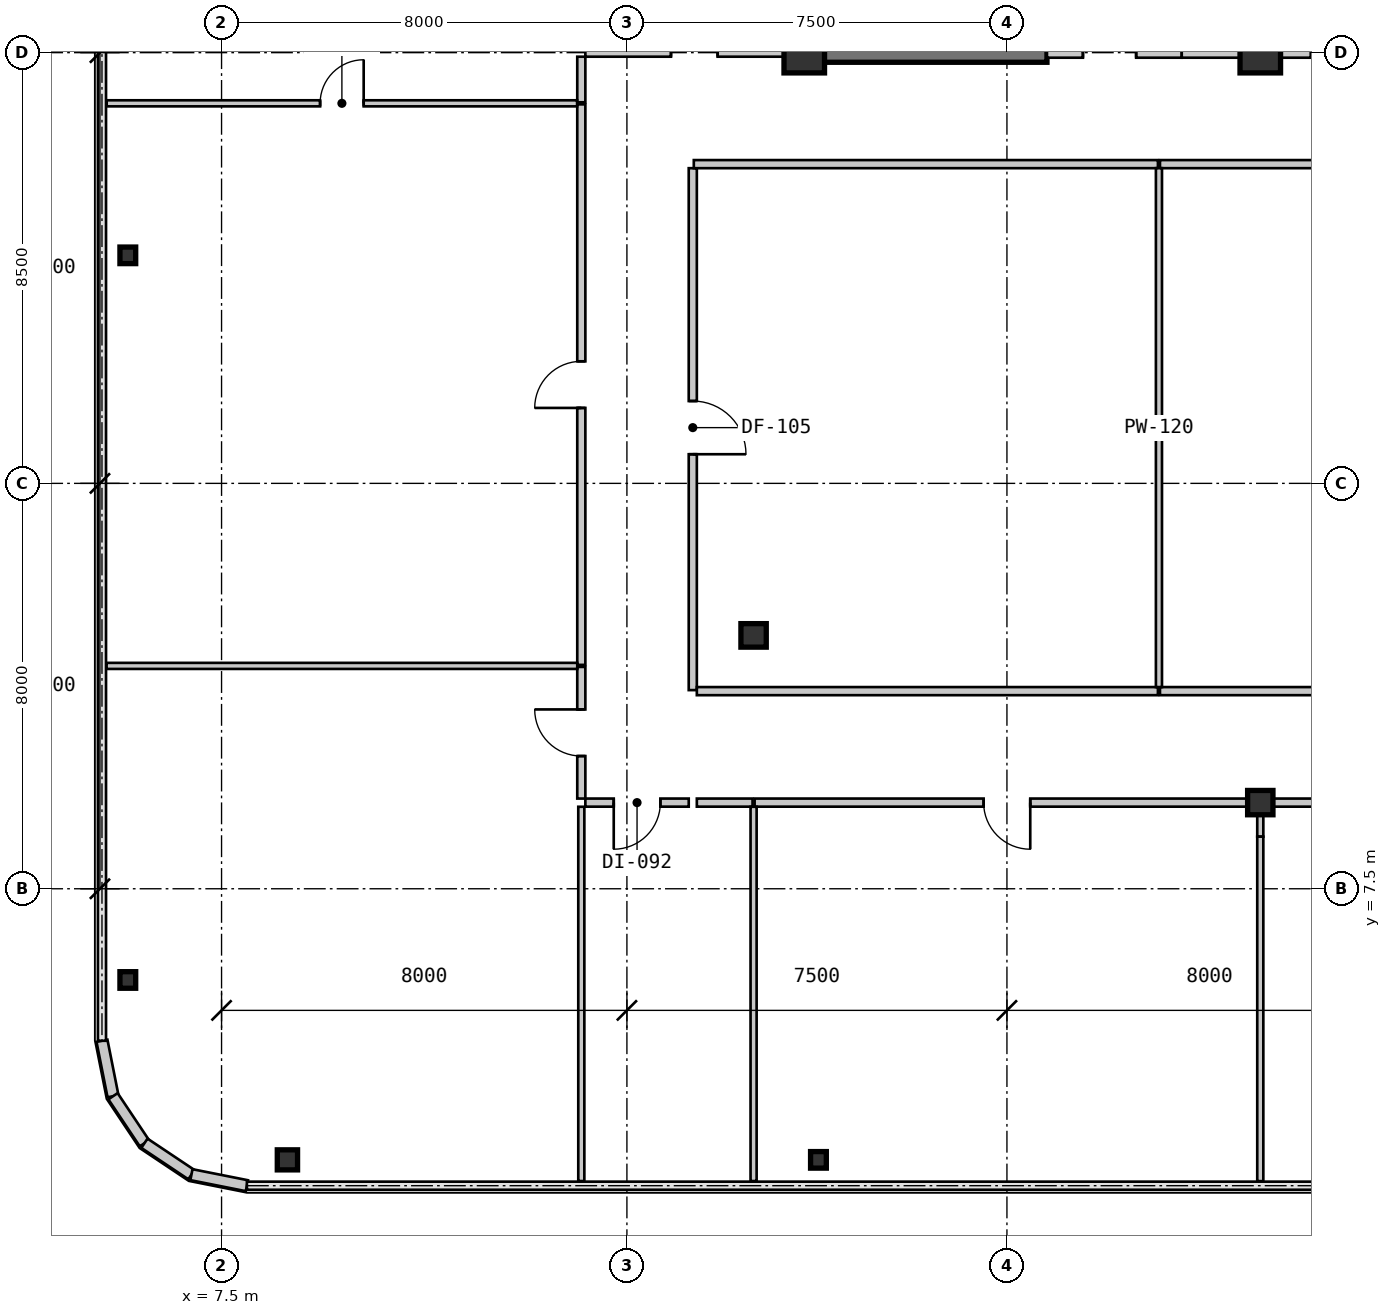
"""IFC4 building model, lengths in metres.
Left out: names, types, materials, properties, quantities, classifications, styles, units other than length and angle.
Written with IfcOpenShell. Run it as: python <this file> out.ifc"""

import sys

from ifc_helpers import new_model, si_unit, direction, frame, frame_2d, origin, origin_2d, place, context, subcontext, project, spatial, rectangle, i_section, extrude, source, transform, mapped, element, fill, save


model = new_model("IFC4")
c1 = context("Model", 3, precision=1e-05, world=origin(), true_north=direction((0.0, 1.0)))
c2 = subcontext(c1, "Body", "Model", "MODEL_VIEW")
j1 = project(units=[si_unit("LENGTHUNIT", "METRE"), si_unit("PLANEANGLEUNIT", "RADIAN")], contexts=[c1])
p1 = place(None, origin())
s1 = spatial("IfcSite", under=j1, at=p1, CompositionType="ELEMENT")
p2 = place(p1, origin())
s2 = spatial("IfcBuilding", under=s1, at=p2, CompositionType="ELEMENT")
p3 = place(p2, frame((0.0, 0.0, 57.75)))
s3 = spatial("IfcBuildingStorey", under=s2, at=p3, CompositionType="ELEMENT", Elevation=57.75)
m1 = source(origin(), c2, "Body", "SweptSolid", [
    extrude(rectangle(XDim=0.8, YDim=0.8, at=origin_2d()), origin(), (0.0, 0.0, 1.0), 3.15),
])
for number, where, z_axis, x_axis in (
    (1, (19.0, 24.0, 0.0), (0.0, 0.0, 1.0), (1.0, 0.0, 0.0)),
    (2, (28.0, 24.0, 0.0), (0.0, 0.0, 1.0), (1.0, 0.0, 0.0)),
):
    element("IfcColumn", number, at=place(p3, frame(where, z_axis=z_axis, x_axis=x_axis)), inside=s3, PredefinedType="COLUMN", context=c2, shape_type="MappedRepresentation", body=[
        mapped(m1, transform((0.0, 0.0, 0.0), scale=1.0)),
    ])
m2 = source(origin(), c2, "Body", "SweptSolid", [
    extrude(i_section(OverallWidth=0.5, OverallDepth=0.48, WebThickness=0.028, FlangeThickness=0.044, at=origin_2d()), origin(), (0.0, 0.0, 1.0), 3.15),
])
p4 = place(p3, frame((28.0, 9.2, 0.0), z_axis=(0.0, 0.0, 1.0), x_axis=(1.0, 0.0, 0.0)))
e3 = element("IfcColumn", 3, at=p4, inside=s3, PredefinedType="COLUMN", context=c2, shape_type="MappedRepresentation", body=[
    mapped(m2, transform((0.0, 0.0, 0.0), scale=1.0)),
])
m3 = source(origin(), c2, "Body", "SweptSolid", [
    extrude(i_section(OverallWidth=0.5, OverallDepth=0.464, WebThickness=0.022, FlangeThickness=0.034, at=origin_2d()), origin(), (0.0, 0.0, 1.0), 3.15),
])
p5 = place(p3, frame((18.0, 12.5, 0.0), z_axis=(0.0, 0.0, 1.0), x_axis=(1.0, 0.0, 0.0)))
e4 = element("IfcColumn", 4, at=p5, inside=s3, PredefinedType="COLUMN", context=c2, shape_type="MappedRepresentation", body=[
    mapped(m3, transform((0.0, 0.0, 0.0), scale=1.0)),
])
m4 = source(origin(), c2, "Body", "SweptSolid", [
    extrude(i_section(OverallWidth=0.4, OverallDepth=0.396, WebThickness=0.022, FlangeThickness=0.034, at=origin_2d()), origin(), (0.0, 0.0, 1.0), 3.15),
])
p6 = place(p3, frame((8.8, 2.15, 0.0), z_axis=(0.0, 0.0, 1.0), x_axis=(1.0, 0.0, 0.0)))
e5 = element("IfcColumn", 5, at=p6, inside=s3, PredefinedType="COLUMN", context=c2, shape_type="MappedRepresentation", body=[
    mapped(m4, transform((0.0, 0.0, 0.0), scale=1.0)),
])
m5 = source(origin(), c2, "Body", "SweptSolid", [
    extrude(i_section(OverallWidth=0.311, OverallDepth=0.327, WebThickness=0.016, FlangeThickness=0.025, at=origin_2d()), origin(), (0.0, 0.0, 1.0), 3.15),
])
for number, where, z_axis, x_axis in (
    (6, (19.28, 2.15, 0.0), (0.0, 0.0, 1.0), (1.0, 0.0, 0.0)),
    (7, (5.65, 5.7, 0.0), (0.0, 0.0, 1.0), (1.0, 0.0, 0.0)),
    (8, (5.65, 20.0, 0.0), (0.0, 0.0, 1.0), (1.0, 0.0, 0.0)),
):
    element("IfcColumn", number, at=place(p3, frame(where, z_axis=z_axis, x_axis=x_axis)), inside=s3, PredefinedType="COLUMN", context=c2, shape_type="MappedRepresentation", body=[
        mapped(m5, transform((0.0, 0.0, 0.0), scale=1.0)),
    ])
m6 = source(origin(), c2, "Body", "SweptSolid", [
    extrude(rectangle(XDim=1.116, YDim=0.22, at=frame_2d((0.558, 0.0))), origin(), (0.0, 0.0, 1.0), 2.87),
])
for number, where, z_axis, x_axis in (
    (9, (5.14, 4.5, 0.0), (0.0, 0.0, 1.0), (0.195, -0.981, 0.0)),
    (10, (5.358, 3.406, 0.0), (0.0, 0.0, 1.0), (0.556, -0.831, 0.0)),
    (11, (5.978, 2.478, 0.0), (0.0, 0.0, 1.0), (0.831, -0.556, 0.0)),
    (12, (6.906, 1.858, 0.0), (0.0, 0.0, 1.0), (0.981, -0.195, 0.0)),
):
    element("IfcWall", number, at=place(p3, frame(where, z_axis=z_axis, x_axis=x_axis)), inside=s3, PredefinedType="SOLIDWALL", context=c2, shape_type="MappedRepresentation", body=[
        mapped(m6, transform((0.0, 0.0, 0.0), scale=1.0)),
    ])
m7 = source(origin(), c2, "Body", "SweptSolid", [
    extrude(rectangle(XDim=4.98, YDim=0.38, at=frame_2d((2.49, 0.0))), origin(), (0.0, 0.0, 1.0), 2.87),
])
p7 = place(p3, frame((18.81, 24.0, 0.0), z_axis=(0.0, 0.0, 1.0), x_axis=(1.0, 0.0, 0.0)))
e13 = element("IfcWall", 13, at=p7, inside=s3, PredefinedType="SHEAR", context=c2, shape_type="MappedRepresentation", body=[
    mapped(m7, transform((0.0, 0.0, 0.0), scale=1.0)),
])
m8 = source(origin(), c2, "Body", "SweptSolid", [
    extrude(rectangle(XDim=2.66, YDim=0.2, at=frame_2d((1.33, 0.0))), origin(), (0.0, 0.0, 1.0), 2.41),
])
p8 = place(p3, frame((23.79, 24.0, 0.0), z_axis=(0.0, 0.0, 1.0), x_axis=(1.0, 0.0, 0.0)))
e14 = element("IfcWall", 14, at=p8, inside=s3, PredefinedType="SOLIDWALL", context=c2, shape_type="MappedRepresentation", body=[
    mapped(m8, transform((0.0, 0.0, 0.0), scale=1.0)),
])
m9 = source(origin(), c2, "Body", "SweptSolid", [
    extrude(rectangle(XDim=1.05, YDim=2.1, at=frame_2d((0.525, 1.05))), frame((0.0, 0.11, 0.0), z_axis=(0.0, -1.0, 0.0), x_axis=(1.0, 0.0, 0.0)), (0.0, 0.0, 1.0), 0.22),
])
p9 = place(p8, frame((0.71, 0.0, 0.0)))
e15 = element("IfcOpeningElement", 15, at=p9, cuts=e14, PredefinedType="OPENING", context=c2, shape_type="MappedRepresentation", body=[
    mapped(m9, transform((0.0, 0.0, 0.0), scale=1.0)),
])
m10 = source(origin(), c2, "Body", "SweptSolid", [
    extrude(rectangle(XDim=4.35, YDim=0.2, at=frame_2d((2.175, 0.0))), origin(), (0.0, 0.0, 1.0), 2.41),
])
p10 = place(p3, frame((30.8, 24.0, 0.0), z_axis=(0.0, 0.0, 1.0), x_axis=(-1.0, 0.0, 0.0)))
e16 = element("IfcWall", 16, at=p10, inside=s3, PredefinedType="SOLIDWALL", context=c2, shape_type="MappedRepresentation", body=[
    mapped(m10, transform((0.0, 0.0, 0.0), scale=1.0)),
])
p11 = place(p10, frame((0.75, 0.0, 0.0)))
e17 = element("IfcOpeningElement", 17, at=p11, cuts=e16, PredefinedType="OPENING", context=c2, shape_type="MappedRepresentation", body=[
    mapped(m9, transform((0.0, 0.0, 0.0), scale=1.0)),
])
m11 = source(origin(), c2, "Body", "SweptSolid", [
    extrude(rectangle(XDim=10.3, YDim=0.16, at=frame_2d((5.15, 0.0))), origin(), (0.0, 0.0, 1.0), 2.87),
])
p12 = place(p3, frame((16.8, 21.72, 0.0), z_axis=(0.0, 0.0, 1.0), x_axis=(0.0, -1.0, 0.0)))
e18 = element("IfcWall", 18, at=p12, inside=s3, PredefinedType="PARTITIONING", context=c2, shape_type="MappedRepresentation", body=[
    mapped(m11, transform((0.0, 0.0, 0.0), scale=1.0)),
])
m12 = source(origin(), c2, "Body", "SweptSolid", [
    extrude(rectangle(XDim=1.05, YDim=2.1, at=frame_2d((0.525, 1.05))), frame((0.0, 0.09, 0.0), z_axis=(0.0, -1.0, 0.0), x_axis=(1.0, 0.0, 0.0)), (0.0, 0.0, 1.0), 0.18),
])
p13 = place(p12, frame((4.595, 0.0, 0.0)))
e19 = element("IfcOpeningElement", 19, at=p13, cuts=e18, PredefinedType="OPENING", context=c2, shape_type="MappedRepresentation", body=[
    mapped(m12, transform((0.0, 0.0, 0.0), scale=1.0)),
])
m13 = source(origin(), c2, "Body", "SweptSolid", [
    extrude(rectangle(XDim=9.159, YDim=0.16, at=frame_2d((4.58, 0.0))), origin(), (0.0, 0.0, 1.0), 2.87),
])
p14 = place(p3, frame((25.98, 21.8, 0.0), z_axis=(0.0, 0.0, 1.0), x_axis=(-1.0, 0.0, 0.0)))
e20 = element("IfcWall", 20, at=p14, inside=s3, PredefinedType="PARTITIONING", context=c2, shape_type="MappedRepresentation", body=[
    mapped(m13, transform((0.0, 0.0, 0.0), scale=1.0)),
])
m14 = source(origin(), c2, "Body", "SweptSolid", [
    extrude(rectangle(XDim=9.959, YDim=0.16, at=frame_2d((4.98, 0.0))), origin(), (0.0, 0.0, 1.0), 2.87),
])
p15 = place(p3, frame((35.98, 21.8, 0.0), z_axis=(0.0, 0.0, 1.0), x_axis=(-1.0, 0.0, 0.0)))
e21 = element("IfcWall", 21, at=p15, inside=s3, PredefinedType="PARTITIONING", context=c2, shape_type="MappedRepresentation", body=[
    mapped(m14, transform((0.0, 0.0, 0.0), scale=1.0)),
])
p16 = place(p15, frame((4.455, 0.0, 0.0)))
e22 = element("IfcOpeningElement", 22, at=p16, cuts=e21, PredefinedType="OPENING", context=c2, shape_type="MappedRepresentation", body=[
    mapped(m12, transform((0.0, 0.0, 0.0), scale=1.0)),
])
m15 = source(origin(), c2, "Body", "SweptSolid", [
    extrude(rectangle(XDim=2.04, YDim=0.16, at=frame_2d((1.02, 0.0))), origin(), (0.0, 0.0, 1.0), 2.87),
])
p17 = place(p3, frame((16.72, 9.2, 0.0), z_axis=(0.0, 0.0, 1.0), x_axis=(-1.0, 0.0, 0.0)))
e23 = element("IfcWall", 23, at=p17, inside=s3, PredefinedType="PARTITIONING", context=c2, shape_type="MappedRepresentation", body=[
    mapped(m15, transform((0.0, 0.0, 0.0), scale=1.0)),
])
m16 = source(origin(), c2, "Body", "SweptSolid", [
    extrude(rectangle(XDim=0.92, YDim=2.1, at=frame_2d((0.46, 1.05))), frame((0.0, 0.09, 0.0), z_axis=(0.0, -1.0, 0.0), x_axis=(1.0, 0.0, 0.0)), (0.0, 0.0, 1.0), 0.18),
])
p18 = place(p17, frame((0.56, 0.0, 0.0)))
e24 = element("IfcOpeningElement", 24, at=p18, cuts=e23, PredefinedType="OPENING", context=c2, shape_type="MappedRepresentation", body=[
    mapped(m16, transform((0.0, 0.0, 0.0), scale=1.0)),
])
m17 = source(origin(), c2, "Body", "SweptSolid", [
    extrude(rectangle(XDim=2.598, YDim=0.16, at=frame_2d((1.299, 0.0))), origin(), (0.0, 0.0, 1.0), 2.87),
])
p19 = place(p3, frame((14.6, 9.28, 0.0), z_axis=(0.0, 0.0, 1.0), x_axis=(0.0, 1.0, 0.0)))
e25 = element("IfcWall", 25, at=p19, inside=s3, PredefinedType="PARTITIONING", context=c2, shape_type="MappedRepresentation", body=[
    mapped(m17, transform((0.0, 0.0, 0.0), scale=1.0)),
])
p20 = place(p19, frame((0.839, 0.0, 0.0)))
e26 = element("IfcOpeningElement", 26, at=p20, cuts=e25, PredefinedType="OPENING", context=c2, shape_type="MappedRepresentation", body=[
    mapped(m16, transform((0.0, 0.0, 0.0), scale=1.0)),
])
m18 = source(origin(), c2, "Body", "SweptSolid", [
    extrude(rectangle(XDim=11.061, YDim=0.16, at=frame_2d((5.531, 0.0))), origin(), (0.0, 0.0, 1.0), 2.87),
])
p21 = place(p3, frame((14.6, 11.918, 0.0), z_axis=(0.0, 0.0, 1.0), x_axis=(0.0, 1.0, 0.0)))
e27 = element("IfcWall", 27, at=p21, inside=s3, PredefinedType="PARTITIONING", context=c2, shape_type="MappedRepresentation", body=[
    mapped(m18, transform((0.0, 0.0, 0.0), scale=1.0)),
])
p22 = place(p21, frame((5.071, 0.0, 0.0)))
e28 = element("IfcOpeningElement", 28, at=p22, cuts=e27, PredefinedType="OPENING", context=c2, shape_type="MappedRepresentation", body=[
    mapped(m16, transform((0.0, 0.0, 0.0), scale=1.0)),
])
m19 = source(origin(), c2, "Body", "SweptSolid", [
    extrude(rectangle(XDim=0.9, YDim=0.16, at=frame_2d((0.45, 0.0))), origin(), (0.0, 0.0, 1.0), 2.87),
])
p23 = place(p3, frame((14.6, 23.02, 0.0), z_axis=(0.0, 0.0, 1.0), x_axis=(0.0, 1.0, 0.0)))
e29 = element("IfcWall", 29, at=p23, inside=s3, PredefinedType="PARTITIONING", context=c2, shape_type="MappedRepresentation", body=[
    mapped(m19, transform((0.0, 0.0, 0.0), scale=1.0)),
])
m20 = source(origin(), c2, "Body", "SweptSolid", [
    extrude(rectangle(XDim=4.13, YDim=0.16, at=frame_2d((2.065, 0.0))), origin(), (0.0, 0.0, 1.0), 2.87),
])
p24 = place(p3, frame((14.68, 24.0, 0.0), z_axis=(0.0, 0.0, 1.0), x_axis=(1.0, 0.0, 0.0)))
e30 = element("IfcWall", 30, at=p24, inside=s3, PredefinedType="PARTITIONING", context=c2, shape_type="MappedRepresentation", body=[
    mapped(m20, transform((0.0, 0.0, 0.0), scale=1.0)),
])
p25 = place(p24, frame((1.69, 0.0, 0.0)))
e31 = element("IfcOpeningElement", 31, at=p25, cuts=e30, PredefinedType="OPENING", context=c2, shape_type="MappedRepresentation", body=[
    mapped(m16, transform((0.0, 0.0, 0.0), scale=1.0)),
])
m21 = source(origin(), c2, "Body", "SweptSolid", [
    extrude(rectangle(XDim=9.1, YDim=0.16, at=frame_2d((4.55, 0.0))), origin(), (0.0, 0.0, 1.0), 2.87),
])
p26 = place(p3, frame((16.88, 11.4, 0.0), z_axis=(0.0, 0.0, 1.0), x_axis=(1.0, 0.0, 0.0)))
e32 = element("IfcWall", 32, at=p26, inside=s3, PredefinedType="PARTITIONING", context=c2, shape_type="MappedRepresentation", body=[
    mapped(m21, transform((0.0, 0.0, 0.0), scale=1.0)),
])
p27 = place(p3, frame((26.02, 11.4, 0.0), z_axis=(0.0, 0.0, 1.0), x_axis=(1.0, 0.0, 0.0)))
e33 = element("IfcWall", 33, at=p27, inside=s3, PredefinedType="PARTITIONING", context=c2, shape_type="MappedRepresentation", body=[
    mapped(m14, transform((0.0, 0.0, 0.0), scale=1.0)),
])
m22 = source(origin(), c2, "Body", "SweptSolid", [
    extrude(rectangle(XDim=1.1, YDim=0.16, at=frame_2d((0.55, 0.0))), origin(), (0.0, 0.0, 1.0), 2.87),
])
p28 = place(p3, frame((17.98, 9.2, 0.0), z_axis=(0.0, 0.0, 1.0), x_axis=(-1.0, 0.0, 0.0)))
e34 = element("IfcWall", 34, at=p28, inside=s3, PredefinedType="PARTITIONING", context=c2, shape_type="MappedRepresentation", body=[
    mapped(m22, transform((0.0, 0.0, 0.0), scale=1.0)),
])
p29 = place(p3, frame((27.98, 9.2, 0.0), z_axis=(0.0, 0.0, 1.0), x_axis=(-1.0, 0.0, 0.0)))
e35 = element("IfcWall", 35, at=p29, inside=s3, PredefinedType="PARTITIONING", context=c2, shape_type="MappedRepresentation", body=[
    mapped(m14, transform((0.0, 0.0, 0.0), scale=1.0)),
])
p30 = place(p29, frame((4.52, 0.0, 0.0)))
e36 = element("IfcOpeningElement", 36, at=p30, cuts=e35, PredefinedType="OPENING", context=c2, shape_type="MappedRepresentation", body=[
    mapped(m16, transform((0.0, 0.0, 0.0), scale=1.0)),
])
m23 = source(origin(), c2, "Body", "SweptSolid", [
    extrude(rectangle(XDim=13.959, YDim=0.16, at=frame_2d((6.98, 0.0))), origin(), (0.0, 0.0, 1.0), 2.268),
])
p31 = place(p3, frame((41.98, 9.2, 0.0), z_axis=(0.0, 0.0, 1.0), x_axis=(-1.0, 0.0, 0.0)))
e37 = element("IfcWall", 37, at=p31, inside=s3, PredefinedType="PARTITIONING", context=c2, shape_type="MappedRepresentation", body=[
    mapped(m23, transform((0.0, 0.0, 0.0), scale=1.0)),
])
p32 = place(p31, frame((6.52, 0.0, 0.0)))
e38 = element("IfcOpeningElement", 38, at=p32, cuts=e37, PredefinedType="OPENING", context=c2, shape_type="MappedRepresentation", body=[
    mapped(m16, transform((0.0, 0.0, 0.0), scale=1.0)),
])
m24 = source(origin(), c2, "Body", "SweptSolid", [
    extrude(rectangle(XDim=10.24, YDim=0.12, at=frame_2d((5.12, 0.0))), origin(), (0.0, 0.0, 1.0), 2.87),
])
p33 = place(p3, frame((26.0, 21.72, 0.0), z_axis=(0.0, 0.0, 1.0), x_axis=(0.0, -1.0, 0.0)))
e39 = element("IfcWall", 39, at=p33, inside=s3, PredefinedType="PARTITIONING", context=c2, shape_type="MappedRepresentation", body=[
    mapped(m24, transform((0.0, 0.0, 0.0), scale=1.0)),
])
m25 = source(origin(), c2, "Body", "SweptSolid", [
    extrude(rectangle(XDim=7.386, YDim=0.12, at=frame_2d((3.693, 0.0))), origin(), (0.0, 0.0, 1.0), 2.87),
])
for number, where, z_axis, x_axis in (
    (40, (18.0, 9.118, 0.0), (0.0, 0.0, 1.0), (0.0, -1.0, 0.0)),
    (41, (14.6, 1.732, 0.0), (0.0, 0.0, 1.0), (0.0, 1.0, 0.0)),
):
    element("IfcWall", number, at=place(p3, frame(where, z_axis=z_axis, x_axis=x_axis)), inside=s3, PredefinedType="PARTITIONING", context=c2, shape_type="MappedRepresentation", body=[
        mapped(m25, transform((0.0, 0.0, 0.0), scale=1.0)),
    ])
m26 = source(origin(), c2, "Body", "SweptSolid", [
    extrude(rectangle(XDim=0.592, YDim=0.12, at=frame_2d((0.296, 0.0))), origin(), (0.0, 0.0, 1.0), 2.337),
])
p34 = place(p3, frame((28.0, 9.12, 0.0), z_axis=(0.0, 0.0, 1.0), x_axis=(0.0, -1.0, 0.0)))
e42 = element("IfcWall", 42, at=p34, inside=s3, PredefinedType="PARTITIONING", context=c2, shape_type="MappedRepresentation", body=[
    mapped(m26, transform((0.0, 0.0, 0.0), scale=1.0)),
])
m27 = source(origin(), c2, "Body", "SweptSolid", [
    extrude(rectangle(XDim=6.798, YDim=0.12, at=frame_2d((3.399, 0.0))), origin(), (0.0, 0.0, 1.0), 2.87),
])
p35 = place(p3, frame((28.0, 8.528, 0.0), z_axis=(0.0, 0.0, 1.0), x_axis=(0.0, -1.0, 0.0)))
e43 = element("IfcWall", 43, at=p35, inside=s3, PredefinedType="PARTITIONING", context=c2, shape_type="MappedRepresentation", body=[
    mapped(m27, transform((0.0, 0.0, 0.0), scale=1.0)),
])
m28 = source(origin(), c2, "Body", "SweptSolid", [
    extrude(rectangle(XDim=9.29, YDim=0.12, at=frame_2d((4.645, 0.0))), origin(), (0.0, 0.0, 1.0), 2.87),
])
p36 = place(p3, frame((5.23, 11.898, 0.0), z_axis=(0.0, 0.0, 1.0), x_axis=(1.0, 0.0, 0.0)))
e44 = element("IfcWall", 44, at=p36, inside=s3, PredefinedType="PARTITIONING", context=c2, shape_type="MappedRepresentation", body=[
    mapped(m28, transform((0.0, 0.0, 0.0), scale=1.0)),
])
m29 = source(origin(), c2, "Body", "SweptSolid", [
    extrude(rectangle(XDim=9.284, YDim=0.12, at=frame_2d((4.642, 0.0))), origin(), (0.0, 0.0, 1.0), 2.87),
])
p37 = place(p3, frame((5.233, 23.0, 0.0), z_axis=(0.0, 0.0, 1.0), x_axis=(1.0, 0.0, 0.0)))
e45 = element("IfcWall", 45, at=p37, inside=s3, PredefinedType="PARTITIONING", context=c2, shape_type="MappedRepresentation", body=[
    mapped(m29, transform((0.0, 0.0, 0.0), scale=1.0)),
])
m30 = source(origin(), c2, "Body", "SweptSolid", [
    extrude(rectangle(XDim=0.86, YDim=2.1, at=frame_2d((0.43, 1.05))), frame((0.0, 0.07, 0.0), z_axis=(0.0, -1.0, 0.0), x_axis=(1.0, 0.0, 0.0)), (0.0, 0.0, 1.0), 0.14),
])
p38 = place(p37, frame((4.212, 0.0, 0.0)))
e46 = element("IfcOpeningElement", 46, at=p38, cuts=e45, PredefinedType="OPENING", context=c2, shape_type="MappedRepresentation", body=[
    mapped(m30, transform((0.0, 0.0, 0.0), scale=1.0)),
])
m31 = source(origin(), c2, "Body", "SweptSolid", [
    extrude(rectangle(XDim=1.05, YDim=2.1, at=frame_2d((0.525, 1.05))), frame((0.0, 0.025, 0.0), z_axis=(0.0, -1.0, 0.0), x_axis=(1.0, 0.0, 0.0)), (0.0, 0.0, 1.0), 0.05),
])
p39 = place(p9, origin())
e47 = element("IfcDoor", 47, at=p39, inside=s3, OperationType="SINGLE_SWING_LEFT", PredefinedType="DOOR", context=c2, shape_type="MappedRepresentation", body=[
    mapped(m31, transform((0.0, 0.0, 0.0), scale=1.0)),
])
fill(e15, e47)
p40 = place(p11, frame((1.05, 0.0, 0.0), z_axis=(0.0, 0.0, 1.0), x_axis=(-1.0, 0.0, 0.0)))
e48 = element("IfcDoor", 48, at=p40, inside=s3, OperationType="SINGLE_SWING_RIGHT", PredefinedType="DOOR", context=c2, shape_type="MappedRepresentation", body=[
    mapped(m31, transform((0.0, 0.0, 0.0), scale=1.0)),
])
fill(e17, e48)
p41 = place(p13, origin())
e49 = element("IfcDoor", 49, at=p41, inside=s3, OperationType="SINGLE_SWING_RIGHT", PredefinedType="DOOR", context=c2, shape_type="MappedRepresentation", body=[
    mapped(m31, transform((0.0, 0.0, 0.0), scale=1.0)),
])
fill(e19, e49)
m32 = source(origin(), c2, "Body", "SweptSolid", [
    extrude(rectangle(XDim=0.92, YDim=2.1, at=frame_2d((0.46, 1.05))), frame((0.0, 0.025, 0.0), z_axis=(0.0, -1.0, 0.0), x_axis=(1.0, 0.0, 0.0)), (0.0, 0.0, 1.0), 0.05),
])
p42 = place(p18, origin())
e50 = element("IfcDoor", 50, at=p42, inside=s3, OperationType="SINGLE_SWING_RIGHT", PredefinedType="DOOR", context=c2, shape_type="MappedRepresentation", body=[
    mapped(m32, transform((0.0, 0.0, 0.0), scale=1.0)),
])
fill(e24, e50)
p43 = place(p20, origin())
e51 = element("IfcDoor", 51, at=p43, inside=s3, OperationType="SINGLE_SWING_RIGHT", PredefinedType="DOOR", context=c2, shape_type="MappedRepresentation", body=[
    mapped(m32, transform((0.0, 0.0, 0.0), scale=1.0)),
])
fill(e26, e51)
p44 = place(p22, origin())
e52 = element("IfcDoor", 52, at=p44, inside=s3, OperationType="SINGLE_SWING_LEFT", PredefinedType="DOOR", context=c2, shape_type="MappedRepresentation", body=[
    mapped(m32, transform((0.0, 0.0, 0.0), scale=1.0)),
])
fill(e28, e52)
p45 = place(p25, origin())
e53 = element("IfcDoor", 53, at=p45, inside=s3, OperationType="SINGLE_SWING_RIGHT", PredefinedType="DOOR", context=c2, shape_type="MappedRepresentation", body=[
    mapped(m32, transform((0.0, 0.0, 0.0), scale=1.0)),
])
fill(e31, e53)
p46 = place(p30, origin())
e54 = element("IfcDoor", 54, at=p46, inside=s3, OperationType="SINGLE_SWING_LEFT", PredefinedType="DOOR", context=c2, shape_type="MappedRepresentation", body=[
    mapped(m32, transform((0.0, 0.0, 0.0), scale=1.0)),
])
fill(e36, e54)
m33 = source(origin(), c2, "Body", "SweptSolid", [
    extrude(rectangle(XDim=0.86, YDim=2.1, at=frame_2d((0.43, 1.05))), frame((0.0, 0.025, 0.0), z_axis=(0.0, -1.0, 0.0), x_axis=(1.0, 0.0, 0.0)), (0.0, 0.0, 1.0), 0.05),
])
p47 = place(p38, origin())
e55 = element("IfcDoor", 55, at=p47, inside=s3, OperationType="SINGLE_SWING_RIGHT", PredefinedType="DOOR", context=c2, shape_type="MappedRepresentation", body=[
    mapped(m33, transform((0.0, 0.0, 0.0), scale=1.0)),
])
fill(e46, e55)
save(model, sys.argv[1])
